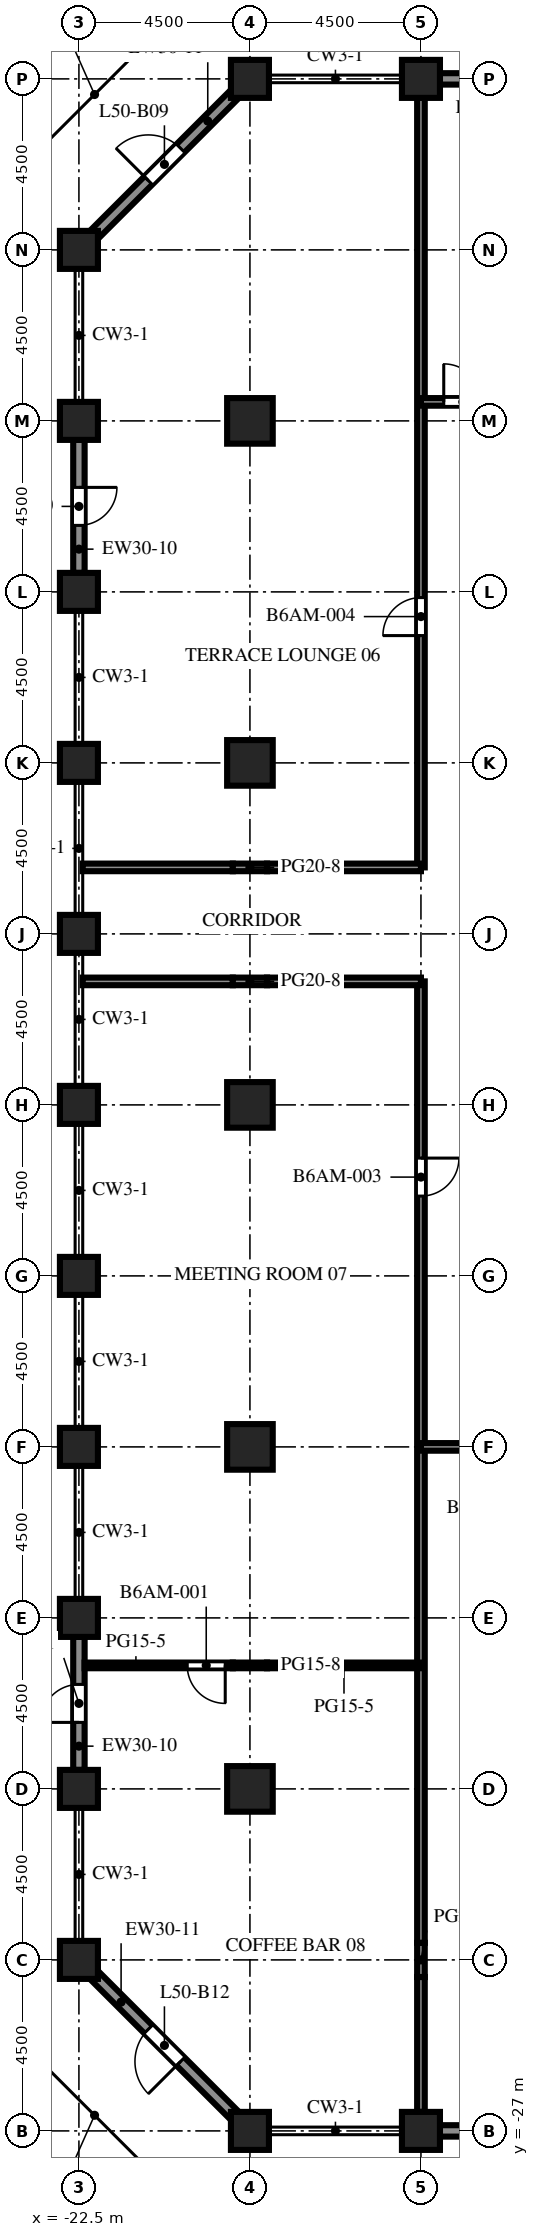
"""IFC4 building model, lengths in metres.
Left out: names, types, materials, properties, quantities, classifications, styles, units other than length and angle.
Written with IfcOpenShell. Run it as: python <this file> out.ifc"""

import sys

from ifc_helpers import new_model, si_unit, direction, frame, frame_2d, origin, origin_2d, place, context, subcontext, project, spatial, rectangle, extrude, element, fill, save


model = new_model("IFC4")
c1 = context("Model", 3, precision=1e-05, world=origin(), true_north=direction((0.0, 1.0)))
c2 = subcontext(c1, "Body", "Model", "MODEL_VIEW")
j1 = project(units=[si_unit("LENGTHUNIT", "METRE"), si_unit("PLANEANGLEUNIT", "RADIAN")], contexts=[c1])
p1 = place(None, origin())
s1 = spatial("IfcSite", under=j1, at=p1, CompositionType="ELEMENT")
p2 = place(p1, origin())
s2 = spatial("IfcBuilding", under=s1, at=p2, CompositionType="ELEMENT")
p3 = place(p2, frame((0.0, 0.0, 220.2)))
s3 = spatial("IfcBuildingStorey", under=s2, at=p3, CompositionType="ELEMENT", Elevation=220.2)
for number, where, z_axis, x_axis in (
    (1, (-22.5, -22.5, 0.0), (0.0, 0.0, 1.0), (1.0, 0.0, 0.0)),
    (2, (-22.5, -18.0, 0.0), (0.0, 0.0, 1.0), (1.0, 0.0, 0.0)),
    (3, (-22.5, -13.5, 0.0), (0.0, 0.0, 1.0), (1.0, 0.0, 0.0)),
    (4, (-22.5, -9.0, 0.0), (0.0, 0.0, 1.0), (1.0, 0.0, 0.0)),
    (5, (-22.5, -4.5, 0.0), (0.0, 0.0, 1.0), (1.0, 0.0, 0.0)),
    (6, (-22.5, 0.0, 0.0), (0.0, 0.0, 1.0), (1.0, 0.0, 0.0)),
    (7, (-22.5, 4.5, 0.0), (0.0, 0.0, 1.0), (1.0, 0.0, 0.0)),
    (8, (-22.5, 9.0, 0.0), (0.0, 0.0, 1.0), (1.0, 0.0, 0.0)),
    (9, (-22.5, 13.5, 0.0), (0.0, 0.0, 1.0), (1.0, 0.0, 0.0)),
    (10, (-22.5, 18.0, 0.0), (0.0, 0.0, 1.0), (1.0, 0.0, 0.0)),
    (11, (-22.5, 22.5, 0.0), (0.0, 0.0, 1.0), (1.0, 0.0, 0.0)),
):
    element("IfcColumn", number, at=place(p3, frame(where, z_axis=z_axis, x_axis=x_axis)), inside=s3, PredefinedType="COLUMN", context=c2, shape_type="SweptSolid", body=[
        extrude(rectangle(XDim=1.0, YDim=1.0, at=origin_2d()), origin(), (0.0, 0.0, 1.0), 6.0),
    ])
for number, where, z_axis, x_axis in (
    (12, (-18.0, -27.0, 0.0), (0.0, 0.0, 1.0), (1.0, 0.0, 0.0)),
    (13, (-18.0, 27.0, 0.0), (0.0, 0.0, 1.0), (1.0, 0.0, 0.0)),
):
    element("IfcColumn", number, at=place(p3, frame(where, z_axis=z_axis, x_axis=x_axis)), inside=s3, PredefinedType="COLUMN", context=c2, shape_type="SweptSolid", body=[
        extrude(rectangle(XDim=1.0, YDim=1.0, at=origin_2d()), origin(), (0.0, 0.0, 1.0), 3.6),
    ])
for number, where, z_axis, x_axis in (
    (14, (-13.5, -27.0, 0.0), (0.0, 0.0, 1.0), (1.0, 0.0, 0.0)),
    (15, (-13.5, 27.0, 0.0), (0.0, 0.0, 1.0), (1.0, 0.0, 0.0)),
):
    element("IfcColumn", number, at=place(p3, frame(where, z_axis=z_axis, x_axis=x_axis)), inside=s3, PredefinedType="COLUMN", context=c2, shape_type="SweptSolid", body=[
        extrude(rectangle(XDim=1.0, YDim=1.0, at=origin_2d()), origin(), (0.0, 0.0, 1.0), 6.0),
    ])
for number, where, z_axis, x_axis in (
    (16, (-18.0, -18.0, 0.0), (0.0, 0.0, 1.0), (1.0, 0.0, 0.0)),
    (17, (-18.0, -9.0, 0.0), (0.0, 0.0, 1.0), (1.0, 0.0, 0.0)),
    (18, (-18.0, 0.0, 0.0), (0.0, 0.0, 1.0), (1.0, 0.0, 0.0)),
    (19, (-18.0, 9.0, 0.0), (0.0, 0.0, 1.0), (1.0, 0.0, 0.0)),
    (20, (-18.0, 18.0, 0.0), (0.0, 0.0, 1.0), (1.0, 0.0, 0.0)),
):
    element("IfcColumn", number, at=place(p3, frame(where, z_axis=z_axis, x_axis=x_axis)), inside=s3, PredefinedType="COLUMN", context=c2, shape_type="SweptSolid", body=[
        extrude(rectangle(XDim=1.2, YDim=1.2, at=origin_2d()), origin(), (0.0, 0.0, 1.0), 5.4),
    ])
p4 = place(p3, frame((-9.5, -27.0, 0.0), z_axis=(0.0, 0.0, 1.0), x_axis=(-1.0, 0.0, 0.0)))
e21 = element("IfcWall", 21, at=p4, inside=s3, PredefinedType="SOLIDWALL", context=c2, shape_type="SweptSolid", body=[
    extrude(rectangle(XDim=3.5, YDim=0.3, at=frame_2d((1.75, 0.0))), origin(), (0.0, 0.0, 1.0), 4.6),
])
p5 = place(p4, frame((1.25, 0.0, 0.0)))
e22 = element("IfcOpeningElement", 22, at=p5, cuts=e21, PredefinedType="OPENING", context=c2, shape_type="SweptSolid", body=[
    extrude(rectangle(XDim=1.0, YDim=2.2, at=frame_2d((0.5, 1.1))), frame((0.0, 0.16, 0.0), z_axis=(0.0, -1.0, 0.0), x_axis=(1.0, 0.0, 0.0)), (0.0, 0.0, 1.0), 0.32),
])
p6 = place(p3, frame((-13.0, 27.0, 0.0), z_axis=(0.0, 0.0, 1.0), x_axis=(1.0, 0.0, 0.0)))
e23 = element("IfcWall", 23, at=p6, inside=s3, PredefinedType="SOLIDWALL", context=c2, shape_type="SweptSolid", body=[
    extrude(rectangle(XDim=3.5, YDim=0.3, at=frame_2d((1.75, 0.0))), origin(), (0.0, 0.0, 1.0), 4.6),
])
p7 = place(p6, frame((1.25, 0.0, 0.0)))
e24 = element("IfcOpeningElement", 24, at=p7, cuts=e23, PredefinedType="OPENING", context=c2, shape_type="SweptSolid", body=[
    extrude(rectangle(XDim=1.0, YDim=2.2, at=frame_2d((0.5, 1.1))), frame((0.0, 0.16, 0.0), z_axis=(0.0, -1.0, 0.0), x_axis=(1.0, 0.0, 0.0)), (0.0, 0.0, 1.0), 0.32),
])
p8 = place(p3, frame((-22.106, 22.894, 0.0), z_axis=(0.0, 0.0, 1.0), x_axis=(0.707106781187, 0.707106781187, 0.0)))
e25 = element("IfcWall", 25, at=p8, inside=s3, PredefinedType="SOLIDWALL", context=c2, shape_type="SweptSolid", body=[
    extrude(rectangle(XDim=5.25, YDim=0.3, at=frame_2d((2.625, 0.0))), origin(), (0.0, 0.0, 1.0), 3.6),
])
p9 = place(p8, frame((2.025, 0.0, 0.0)))
e26 = element("IfcOpeningElement", 26, at=p9, cuts=e25, PredefinedType="OPENING", context=c2, shape_type="SweptSolid", body=[
    extrude(rectangle(XDim=1.2, YDim=2.2, at=frame_2d((0.6, 1.1))), frame((0.0, 0.16, 0.0), z_axis=(0.0, -1.0, 0.0), x_axis=(1.0, 0.0, 0.0)), (0.0, 0.0, 1.0), 0.32),
])
p10 = place(p3, frame((-22.5, 14.0, 0.0), z_axis=(0.0, 0.0, 1.0), x_axis=(0.0, 1.0, 0.0)))
e27 = element("IfcWall", 27, at=p10, inside=s3, PredefinedType="SOLIDWALL", context=c2, shape_type="SweptSolid", body=[
    extrude(rectangle(XDim=3.5, YDim=0.3, at=frame_2d((1.75, 0.0))), origin(), (0.0, 0.0, 1.0), 4.6),
])
p11 = place(p10, frame((1.25, 0.0, 0.0)))
e28 = element("IfcOpeningElement", 28, at=p11, cuts=e27, PredefinedType="OPENING", context=c2, shape_type="SweptSolid", body=[
    extrude(rectangle(XDim=1.0, YDim=2.2, at=frame_2d((0.5, 1.1))), frame((0.0, 0.16, 0.0), z_axis=(0.0, -1.0, 0.0), x_axis=(1.0, 0.0, 0.0)), (0.0, 0.0, 1.0), 0.32),
])
p12 = place(p3, frame((-22.5, -17.5, 0.0), z_axis=(0.0, 0.0, 1.0), x_axis=(0.0, 1.0, 0.0)))
e29 = element("IfcWall", 29, at=p12, inside=s3, PredefinedType="SOLIDWALL", context=c2, shape_type="SweptSolid", body=[
    extrude(rectangle(XDim=3.5, YDim=0.3, at=frame_2d((1.75, 0.0))), origin(), (0.0, 0.0, 1.0), 4.6),
])
p13 = place(p12, frame((1.25, 0.0, 0.0)))
e30 = element("IfcOpeningElement", 30, at=p13, cuts=e29, PredefinedType="OPENING", context=c2, shape_type="SweptSolid", body=[
    extrude(rectangle(XDim=1.0, YDim=2.2, at=frame_2d((0.5, 1.1))), frame((0.0, 0.16, 0.0), z_axis=(0.0, -1.0, 0.0), x_axis=(1.0, 0.0, 0.0)), (0.0, 0.0, 1.0), 0.32),
])
p14 = place(p3, frame((-18.394, -26.606, 0.0), z_axis=(0.0, 0.0, 1.0), x_axis=(-0.707106781187, 0.707106781187, 0.0)))
e31 = element("IfcWall", 31, at=p14, inside=s3, PredefinedType="SOLIDWALL", context=c2, shape_type="SweptSolid", body=[
    extrude(rectangle(XDim=5.25, YDim=0.3, at=frame_2d((2.625, 0.0))), origin(), (0.0, 0.0, 1.0), 3.6),
])
p15 = place(p14, frame((2.025, 0.0, 0.0)))
e32 = element("IfcOpeningElement", 32, at=p15, cuts=e31, PredefinedType="OPENING", context=c2, shape_type="SweptSolid", body=[
    extrude(rectangle(XDim=1.2, YDim=2.2, at=frame_2d((0.6, 1.1))), frame((0.0, 0.16, 0.0), z_axis=(0.0, -1.0, 0.0), x_axis=(1.0, 0.0, 0.0)), (0.0, 0.0, 1.0), 0.32),
])
p16 = place(p3, frame((-13.5, -26.5, 0.0), z_axis=(0.0, 0.0, 1.0), x_axis=(0.0, 1.0, 0.0)))
e33 = element("IfcWall", 33, at=p16, inside=s3, PredefinedType="PARTITIONING", context=c2, shape_type="SweptSolid", body=[
    extrude(rectangle(XDim=3.55, YDim=0.2, at=frame_2d((1.775, 0.0))), origin(), (0.0, 0.0, 1.0), 5.4),
])
p17 = place(p3, frame((-13.5, -22.95, 0.0), z_axis=(0.0, 0.0, 1.0), x_axis=(0.0, 1.0, 0.0)))
e34 = element("IfcWall", 34, at=p17, inside=s3, PredefinedType="PARTITIONING", context=c2, shape_type="SweptSolid", body=[
    extrude(rectangle(XDim=0.9, YDim=0.2, at=frame_2d((0.45, 0.0))), origin(), (0.0, 0.0, 1.0), 3.57),
])
p18 = place(p3, frame((-13.5, -22.05, 0.0), z_axis=(0.0, 0.0, 1.0), x_axis=(0.0, 1.0, 0.0)))
e35 = element("IfcWall", 35, at=p18, inside=s3, PredefinedType="PARTITIONING", context=c2, shape_type="SweptSolid", body=[
    extrude(rectangle(XDim=25.3, YDim=0.2, at=frame_2d((12.65, 0.0))), origin(), (0.0, 0.0, 1.0), 5.4),
])
p19 = place(p18, frame((19.65, 0.0, 0.0)))
e36 = element("IfcOpeningElement", 36, at=p19, cuts=e35, PredefinedType="OPENING", context=c2, shape_type="SweptSolid", body=[
    extrude(rectangle(XDim=1.0, YDim=2.1, at=frame_2d((0.5, 1.05))), frame((0.0, 0.11, 0.0), z_axis=(0.0, -1.0, 0.0), x_axis=(1.0, 0.0, 0.0)), (0.0, 0.0, 1.0), 0.22),
])
p20 = place(p3, frame((-13.5, 6.25, 0.0), z_axis=(0.0, 0.0, 1.0), x_axis=(0.0, 1.0, 0.0)))
e37 = element("IfcWall", 37, at=p20, inside=s3, PredefinedType="PARTITIONING", context=c2, shape_type="SweptSolid", body=[
    extrude(rectangle(XDim=20.25, YDim=0.2, at=frame_2d((10.125, 0.0))), origin(), (0.0, 0.0, 1.0), 5.4),
])
p21 = place(p20, frame((6.1, 0.0, 0.0)))
e38 = element("IfcOpeningElement", 38, at=p21, cuts=e37, PredefinedType="OPENING", context=c2, shape_type="SweptSolid", body=[
    extrude(rectangle(XDim=1.0, YDim=2.1, at=frame_2d((0.5, 1.05))), frame((0.0, 0.11, 0.0), z_axis=(0.0, -1.0, 0.0), x_axis=(1.0, 0.0, 0.0)), (0.0, 0.0, 1.0), 0.22),
])
p22 = place(p3, frame((-18.45, -14.75, 0.0), z_axis=(0.0, 0.0, 1.0), x_axis=(-1.0, 0.0, 0.0)))
e39 = element("IfcWall", 39, at=p22, inside=s3, PredefinedType="PARTITIONING", context=c2, shape_type="SweptSolid", body=[
    extrude(rectangle(XDim=3.9, YDim=0.15, at=frame_2d((1.95, 0.0))), origin(), (0.0, 0.0, 1.0), 5.4),
])
p23 = place(p22, frame((0.2, 0.0, 0.0)))
e40 = element("IfcOpeningElement", 40, at=p23, cuts=e39, PredefinedType="OPENING", context=c2, shape_type="SweptSolid", body=[
    extrude(rectangle(XDim=1.0, YDim=2.1, at=frame_2d((0.5, 1.05))), frame((0.0, 0.085, 0.0), z_axis=(0.0, -1.0, 0.0), x_axis=(1.0, 0.0, 0.0)), (0.0, 0.0, 1.0), 0.17),
])
p24 = place(p3, frame((-18.45, -14.75, 0.0), z_axis=(0.0, 0.0, 1.0), x_axis=(1.0, 0.0, 0.0)))
e41 = element("IfcWall", 41, at=p24, inside=s3, PredefinedType="PARTITIONING", context=c2, shape_type="SweptSolid", body=[
    extrude(rectangle(XDim=0.9, YDim=0.15, at=frame_2d((0.45, 0.0))), origin(), (0.0, 0.0, 1.0), 3.57),
])
p25 = place(p3, frame((-17.55, -14.75, 0.0), z_axis=(0.0, 0.0, 1.0), x_axis=(1.0, 0.0, 0.0)))
e42 = element("IfcWall", 42, at=p25, inside=s3, PredefinedType="PARTITIONING", context=c2, shape_type="SweptSolid", body=[
    extrude(rectangle(XDim=4.05, YDim=0.15, at=frame_2d((2.025, 0.0))), origin(), (0.0, 0.0, 1.0), 5.4),
])
p26 = place(p3, frame((-10.5, -9.0, 0.0), z_axis=(0.0, 0.0, 1.0), x_axis=(-1.0, 0.0, 0.0)))
e43 = element("IfcWall", 43, at=p26, inside=s3, PredefinedType="PARTITIONING", context=c2, shape_type="SweptSolid", body=[
    extrude(rectangle(XDim=3.0, YDim=0.2, at=frame_2d((1.5, 0.0))), origin(), (0.0, 0.0, 1.0), 5.4),
])
p27 = place(p26, frame((0.65, 0.0, 0.0)))
e44 = element("IfcOpeningElement", 44, at=p27, cuts=e43, PredefinedType="OPENING", context=c2, shape_type="SweptSolid", body=[
    extrude(rectangle(XDim=1.0, YDim=2.1, at=frame_2d((0.5, 1.05))), frame((0.0, 0.11, 0.0), z_axis=(0.0, -1.0, 0.0), x_axis=(1.0, 0.0, 0.0)), (0.0, 0.0, 1.0), 0.22),
])
p28 = place(p3, frame((-22.4, 3.25, 0.0), z_axis=(0.0, 0.0, 1.0), x_axis=(1.0, 0.0, 0.0)))
e45 = element("IfcWall", 45, at=p28, inside=s3, PredefinedType="PARTITIONING", context=c2, shape_type="SweptSolid", body=[
    extrude(rectangle(XDim=3.95, YDim=0.2, at=frame_2d((1.975, 0.0))), origin(), (0.0, 0.0, 1.0), 5.4),
])
p29 = place(p3, frame((-18.45, 3.25, 0.0), z_axis=(0.0, 0.0, 1.0), x_axis=(1.0, 0.0, 0.0)))
e46 = element("IfcWall", 46, at=p29, inside=s3, PredefinedType="PARTITIONING", context=c2, shape_type="SweptSolid", body=[
    extrude(rectangle(XDim=0.9, YDim=0.2, at=frame_2d((0.45, 0.0))), origin(), (0.0, 0.0, 1.0), 3.57),
])
p30 = place(p3, frame((-17.55, 3.25, 0.0), z_axis=(0.0, 0.0, 1.0), x_axis=(1.0, 0.0, 0.0)))
e47 = element("IfcWall", 47, at=p30, inside=s3, PredefinedType="PARTITIONING", context=c2, shape_type="SweptSolid", body=[
    extrude(rectangle(XDim=4.05, YDim=0.2, at=frame_2d((2.025, 0.0))), origin(), (0.0, 0.0, 1.0), 5.4),
])
p31 = place(p3, frame((-22.4, 6.25, 0.0), z_axis=(0.0, 0.0, 1.0), x_axis=(1.0, 0.0, 0.0)))
e48 = element("IfcWall", 48, at=p31, inside=s3, PredefinedType="PARTITIONING", context=c2, shape_type="SweptSolid", body=[
    extrude(rectangle(XDim=3.95, YDim=0.2, at=frame_2d((1.975, 0.0))), origin(), (0.0, 0.0, 1.0), 5.4),
])
p32 = place(p3, frame((-18.45, 6.25, 0.0), z_axis=(0.0, 0.0, 1.0), x_axis=(1.0, 0.0, 0.0)))
e49 = element("IfcWall", 49, at=p32, inside=s3, PredefinedType="PARTITIONING", context=c2, shape_type="SweptSolid", body=[
    extrude(rectangle(XDim=0.9, YDim=0.2, at=frame_2d((0.45, 0.0))), origin(), (0.0, 0.0, 1.0), 3.57),
])
p33 = place(p3, frame((-17.55, 6.25, 0.0), z_axis=(0.0, 0.0, 1.0), x_axis=(1.0, 0.0, 0.0)))
e50 = element("IfcWall", 50, at=p33, inside=s3, PredefinedType="PARTITIONING", context=c2, shape_type="SweptSolid", body=[
    extrude(rectangle(XDim=4.05, YDim=0.2, at=frame_2d((2.025, 0.0))), origin(), (0.0, 0.0, 1.0), 5.4),
])
p34 = place(p3, frame((-13.5, 18.5, 0.0), z_axis=(0.0, 0.0, 1.0), x_axis=(1.0, 0.0, 0.0)))
e51 = element("IfcWall", 51, at=p34, inside=s3, PredefinedType="PARTITIONING", context=c2, shape_type="SweptSolid", body=[
    extrude(rectangle(XDim=3.0, YDim=0.2, at=frame_2d((1.5, 0.0))), origin(), (0.0, 0.0, 1.0), 5.4),
])
p35 = place(p34, frame((0.6, 0.0, 0.0)))
e52 = element("IfcOpeningElement", 52, at=p35, cuts=e51, PredefinedType="OPENING", context=c2, shape_type="SweptSolid", body=[
    extrude(rectangle(XDim=1.0, YDim=2.1, at=frame_2d((0.5, 1.05))), frame((0.0, 0.11, 0.0), z_axis=(0.0, -1.0, 0.0), x_axis=(1.0, 0.0, 0.0)), (0.0, 0.0, 1.0), 0.22),
])
p36 = place(p9, origin())
e53 = element("IfcDoor", 53, at=p36, inside=s3, OperationType="SINGLE_SWING_LEFT", PredefinedType="DOOR", context=c2, shape_type="SweptSolid", body=[
    extrude(rectangle(XDim=1.2, YDim=2.2, at=frame_2d((0.6, 1.1))), frame((0.0, 0.025, 0.0), z_axis=(0.0, -1.0, 0.0), x_axis=(1.0, 0.0, 0.0)), (0.0, 0.0, 1.0), 0.05),
])
fill(e26, e53)
p37 = place(p11, origin())
e54 = element("IfcDoor", 54, at=p37, inside=s3, OperationType="SINGLE_SWING_RIGHT", PredefinedType="DOOR", context=c2, shape_type="SweptSolid", body=[
    extrude(rectangle(XDim=1.0, YDim=2.2, at=frame_2d((0.5, 1.1))), frame((0.0, 0.025, 0.0), z_axis=(0.0, -1.0, 0.0), x_axis=(1.0, 0.0, 0.0)), (0.0, 0.0, 1.0), 0.05),
])
fill(e28, e54)
p38 = place(p13, origin())
e55 = element("IfcDoor", 55, at=p38, inside=s3, OperationType="SINGLE_SWING_LEFT", PredefinedType="DOOR", context=c2, shape_type="SweptSolid", body=[
    extrude(rectangle(XDim=1.0, YDim=2.2, at=frame_2d((0.5, 1.1))), frame((0.0, 0.025, 0.0), z_axis=(0.0, -1.0, 0.0), x_axis=(1.0, 0.0, 0.0)), (0.0, 0.0, 1.0), 0.05),
])
fill(e30, e55)
p39 = place(p15, origin())
e56 = element("IfcDoor", 56, at=p39, inside=s3, OperationType="SINGLE_SWING_LEFT", PredefinedType="DOOR", context=c2, shape_type="SweptSolid", body=[
    extrude(rectangle(XDim=1.2, YDim=2.2, at=frame_2d((0.6, 1.1))), frame((0.0, 0.025, 0.0), z_axis=(0.0, -1.0, 0.0), x_axis=(1.0, 0.0, 0.0)), (0.0, 0.0, 1.0), 0.05),
])
fill(e32, e56)
p40 = place(p23, origin())
e57 = element("IfcDoor", 57, at=p40, inside=s3, OperationType="SINGLE_SWING_LEFT", PredefinedType="DOOR", context=c2, shape_type="SweptSolid", body=[
    extrude(rectangle(XDim=1.0, YDim=2.1, at=frame_2d((0.5, 1.05))), frame((0.0, 0.025, 0.0), z_axis=(0.0, -1.0, 0.0), x_axis=(1.0, 0.0, 0.0)), (0.0, 0.0, 1.0), 0.05),
])
fill(e40, e57)
p41 = place(p19, origin())
e58 = element("IfcDoor", 58, at=p41, inside=s3, OperationType="SINGLE_SWING_RIGHT", PredefinedType="DOOR", context=c2, shape_type="SweptSolid", body=[
    extrude(rectangle(XDim=1.0, YDim=2.1, at=frame_2d((0.5, 1.05))), frame((0.0, 0.025, 0.0), z_axis=(0.0, -1.0, 0.0), x_axis=(1.0, 0.0, 0.0)), (0.0, 0.0, 1.0), 0.05),
])
fill(e36, e58)
p42 = place(p21, origin())
e59 = element("IfcDoor", 59, at=p42, inside=s3, OperationType="SINGLE_SWING_LEFT", PredefinedType="DOOR", context=c2, shape_type="SweptSolid", body=[
    extrude(rectangle(XDim=1.0, YDim=2.1, at=frame_2d((0.5, 1.05))), frame((0.0, 0.025, 0.0), z_axis=(0.0, -1.0, 0.0), x_axis=(1.0, 0.0, 0.0)), (0.0, 0.0, 1.0), 0.05),
])
fill(e38, e59)
p43 = place(p35, origin())
e60 = element("IfcDoor", 60, at=p43, inside=s3, OperationType="SINGLE_SWING_LEFT", PredefinedType="DOOR", context=c2, shape_type="SweptSolid", body=[
    extrude(rectangle(XDim=1.0, YDim=2.1, at=frame_2d((0.5, 1.05))), frame((0.0, 0.025, 0.0), z_axis=(0.0, -1.0, 0.0), x_axis=(1.0, 0.0, 0.0)), (0.0, 0.0, 1.0), 0.05),
])
fill(e52, e60)
save(model, sys.argv[1])
